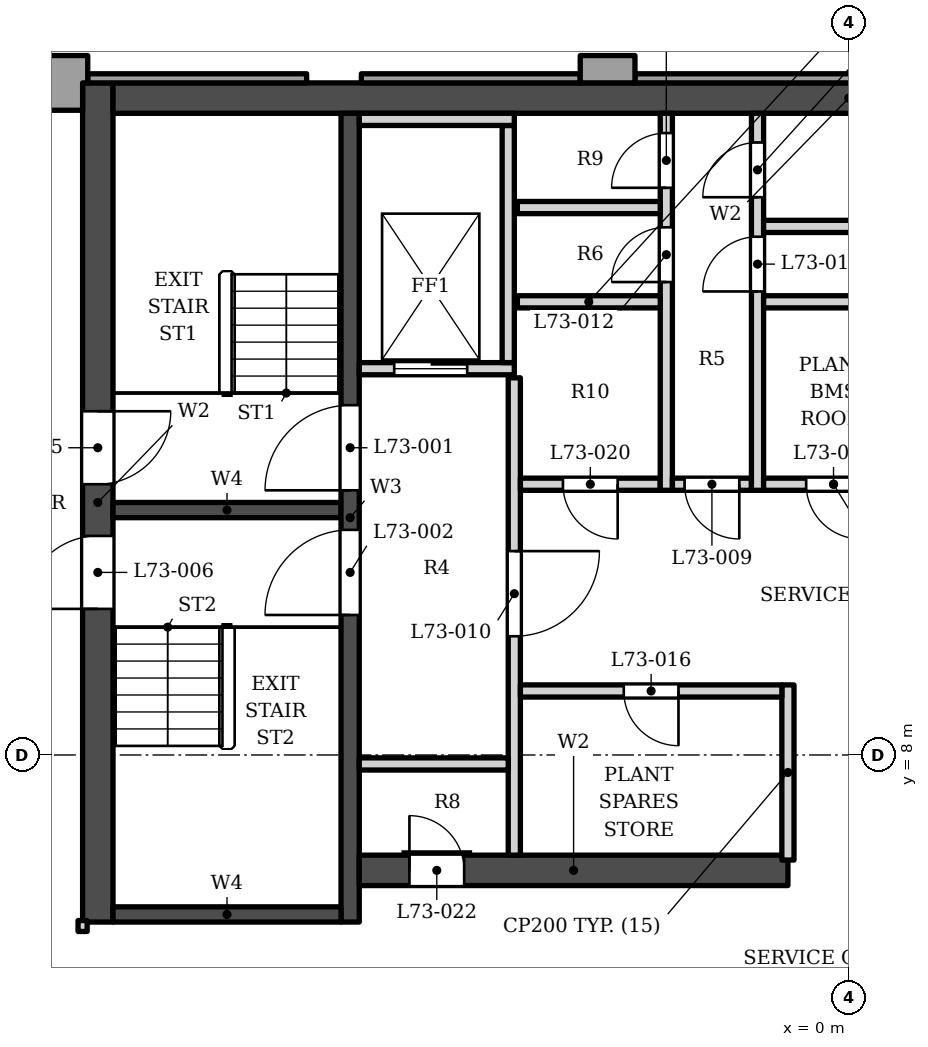
"""IFC4 building model, lengths in metres.
Left out: names, types, materials, properties, quantities, classifications, styles, units other than length and angle.
Written with IfcOpenShell. Run it as: python <this file> out.ifc"""

import sys

from ifc_helpers import new_model, si_unit, direction, frame, frame_2d, origin, place, context, subcontext, project, spatial, polyline, rectangle, outline, extrude, element, fill, save


model = new_model("IFC4")
c1 = context("Model", 3, precision=1e-05, world=origin(), true_north=direction((0.0, 1.0)))
c2 = subcontext(c1, "Body", "Model", "MODEL_VIEW")
j1 = project(units=[si_unit("LENGTHUNIT", "METRE"), si_unit("PLANEANGLEUNIT", "RADIAN")], contexts=[c1])
p1 = place(None, origin())
s1 = spatial("IfcSite", under=j1, at=p1, CompositionType="ELEMENT")
p2 = place(p1, origin())
s2 = spatial("IfcBuilding", under=s1, at=p2, CompositionType="ELEMENT")
p3 = place(p2, frame((0.0, 0.0, 310.5)))
s3 = spatial("IfcBuildingStorey", under=s2, at=p3, CompositionType="ELEMENT", Elevation=310.5)
p4 = place(p3, frame((-12.1, 18.802, 0.0), z_axis=(0.0, 0.0, 1.0), x_axis=(1.0, 0.0, 0.0)))
e1 = element("IfcWall", 1, at=p4, inside=s3, PredefinedType="SHEAR", context=c2, shape_type="SweptSolid", body=[
    extrude(rectangle(XDim=24.2, YDim=0.5, at=frame_2d((12.1, 0.0))), origin(), (0.0, 0.0, 1.0), 5.0),
])
p5 = place(p3, frame((-12.35, 5.253, 0.0), z_axis=(0.0, 0.0, 1.0), x_axis=(0.0, 1.0, 0.0)))
e2 = element("IfcWall", 2, at=p5, inside=s3, PredefinedType="SHEAR", context=c2, shape_type="SweptSolid", body=[
    extrude(rectangle(XDim=13.8, YDim=0.5, at=frame_2d((6.9, 0.0))), origin(), (0.0, 0.0, 1.0), 5.0),
])
p6 = place(p5, frame((7.2, 0.0, 0.0)))
e3 = element("IfcOpeningElement", 3, at=p6, cuts=e2, PredefinedType="OPENING", context=c2, shape_type="SweptSolid", body=[
    extrude(rectangle(XDim=1.2, YDim=2.1, at=frame_2d((0.6, 1.05))), frame((0.0, 0.26, 0.0), z_axis=(0.0, -1.0, 0.0), x_axis=(1.0, 0.0, 0.0)), (0.0, 0.0, 1.0), 0.52),
])
p7 = place(p5, frame((5.15, 0.0, 0.0)))
e4 = element("IfcOpeningElement", 4, at=p7, cuts=e2, PredefinedType="OPENING", context=c2, shape_type="SweptSolid", body=[
    extrude(rectangle(XDim=1.2, YDim=2.1, at=frame_2d((0.6, 1.05))), frame((0.0, 0.26, 0.0), z_axis=(0.0, -1.0, 0.0), x_axis=(1.0, 0.0, 0.0)), (0.0, 0.0, 1.0), 0.52),
])
p8 = place(p3, frame((-8.2, 5.253, 0.0), z_axis=(0.0, 0.0, 1.0), x_axis=(0.0, 1.0, 0.0)))
e5 = element("IfcWall", 5, at=p8, inside=s3, PredefinedType="SHEAR", context=c2, shape_type="SweptSolid", body=[
    extrude(rectangle(XDim=13.3, YDim=0.3, at=frame_2d((6.65, 0.0))), origin(), (0.0, 0.0, 1.0), 5.0),
])
p9 = place(p8, frame((7.1, 0.0, 0.0)))
e6 = element("IfcOpeningElement", 6, at=p9, cuts=e5, PredefinedType="OPENING", context=c2, shape_type="SweptSolid", body=[
    extrude(rectangle(XDim=1.4, YDim=2.1, at=frame_2d((0.7, 1.05))), frame((0.0, 0.16, 0.0), z_axis=(0.0, -1.0, 0.0), x_axis=(1.0, 0.0, 0.0)), (0.0, 0.0, 1.0), 0.32),
])
p10 = place(p8, frame((5.05, 0.0, 0.0)))
e7 = element("IfcOpeningElement", 7, at=p10, cuts=e5, PredefinedType="OPENING", context=c2, shape_type="SweptSolid", body=[
    extrude(rectangle(XDim=1.4, YDim=2.1, at=frame_2d((0.7, 1.05))), frame((0.0, 0.16, 0.0), z_axis=(0.0, -1.0, 0.0), x_axis=(1.0, 0.0, 0.0)), (0.0, 0.0, 1.0), 0.32),
])
for number, where, z_axis, x_axis in (
    (8, (-12.1, 12.028, 0.0), (0.0, 0.0, 1.0), (1.0, 0.0, 0.0)),
    (9, (-12.1, 5.378, 0.0), (0.0, 0.0, 1.0), (1.0, 0.0, 0.0)),
):
    element("IfcWall", number, at=place(p3, frame(where, z_axis=z_axis, x_axis=x_axis)), inside=s3, PredefinedType="SHEAR", context=c2, shape_type="SweptSolid", body=[
        extrude(rectangle(XDim=3.75, YDim=0.25, at=frame_2d((1.875, 0.0))), origin(), (0.0, 0.0, 1.0), 5.0),
    ])
p11 = place(p3, frame((-8.05, 6.103, 0.0), z_axis=(0.0, 0.0, 1.0), x_axis=(1.0, 0.0, 0.0)))
e10 = element("IfcWall", 10, at=p11, inside=s3, PredefinedType="SHEAR", context=c2, shape_type="SweptSolid", body=[
    extrude(rectangle(XDim=7.05, YDim=0.5, at=frame_2d((3.525, 0.0))), origin(), (0.0, 0.0, 1.0), 5.0),
])
p12 = place(p11, frame((0.825, 0.0, 0.0)))
e11 = element("IfcOpeningElement", 11, at=p12, cuts=e10, PredefinedType="OPENING", context=c2, shape_type="SweptSolid", body=[
    extrude(rectangle(XDim=0.9, YDim=2.1, at=frame_2d((0.45, 1.05))), frame((0.0, 0.26, 0.0), z_axis=(0.0, -1.0, 0.0), x_axis=(1.0, 0.0, 0.0)), (0.0, 0.0, 1.0), 0.52),
])
p13 = place(p3, origin())
e12 = element("IfcWall", 12, at=p13, inside=s3, PredefinedType="SOLIDWALL", context=c2, shape_type="SweptSolid", body=[
    extrude(outline(polyline([(-4.416, 19.502), (-4.416, 19.052), (-3.516, 19.052), (-3.516, 19.502), (-4.416, 19.502)])), origin(), (0.0, 0.0, 1.0), 3.8),
])
p14 = place(p3, origin())
e13 = element("IfcWall", 13, at=p14, inside=s3, PredefinedType="SOLIDWALL", context=c2, shape_type="SweptSolid", body=[
    extrude(outline(polyline([(-13.416, 19.502), (-13.416, 18.603), (-12.6, 18.603), (-12.6, 19.052), (-12.516, 19.052), (-12.516, 19.502), (-13.416, 19.502)])), origin(), (0.0, 0.0, 1.0), 3.8),
])
p15 = place(p3, origin())
e14 = element("IfcWall", 14, at=p15, inside=s3, PredefinedType="ELEMENTEDWALL", context=c2, shape_type="SweptSolid", body=[
    extrude(outline(polyline([(0.084, 19.203), (-3.516, 19.203), (-3.516, 19.052), (0.084, 19.052), (0.084, 19.203)])), origin(), (0.0, 0.0, 1.0), 3.8),
])
p16 = place(p3, origin())
e15 = element("IfcWall", 15, at=p16, inside=s3, PredefinedType="ELEMENTEDWALL", context=c2, shape_type="SweptSolid", body=[
    extrude(outline(polyline([(-4.416, 19.203), (-8.016, 19.203), (-8.016, 19.052), (-4.416, 19.052), (-4.416, 19.203)])), origin(), (0.0, 0.0, 1.0), 3.8),
])
p17 = place(p3, origin())
e16 = element("IfcWall", 16, at=p17, inside=s3, PredefinedType="ELEMENTEDWALL", context=c2, shape_type="SweptSolid", body=[
    extrude(outline(polyline([(-8.916, 19.203), (-12.516, 19.203), (-12.516, 19.052), (-8.916, 19.052), (-8.916, 19.203)])), origin(), (0.0, 0.0, 1.0), 3.8),
])
p18 = place(p3, frame((-1.0, 6.273, 0.0), z_axis=(0.0, 0.0, 1.0), x_axis=(0.0, 1.0, 0.0)))
e17 = element("IfcWall", 17, at=p18, inside=s3, PredefinedType="PARTITIONING", context=c2, shape_type="SweptSolid", body=[
    extrude(rectangle(XDim=2.88, YDim=0.2, at=frame_2d((1.44, 0.0))), origin(), (0.0, 0.0, 1.0), 4.8),
])
p19 = place(p3, frame((-5.5, 6.353, 0.0), z_axis=(0.0, 0.0, 1.0), x_axis=(0.0, 1.0, 0.0)))
e18 = element("IfcWall", 18, at=p19, inside=s3, PredefinedType="SOLIDWALL", context=c2, shape_type="SweptSolid", body=[
    extrude(rectangle(XDim=7.85, YDim=0.2, at=frame_2d((3.925, 0.0))), origin(), (0.0, 0.0, 1.0), 4.8),
])
p20 = place(p19, frame((3.6, 0.0, 0.0)))
e19 = element("IfcOpeningElement", 19, at=p20, cuts=e18, PredefinedType="OPENING", context=c2, shape_type="SweptSolid", body=[
    extrude(rectangle(XDim=1.4, YDim=2.1, at=frame_2d((0.7, 1.05))), frame((0.0, 0.11, 0.0), z_axis=(0.0, -1.0, 0.0), x_axis=(1.0, 0.0, 0.0)), (0.0, 0.0, 1.0), 0.22),
])
p21 = place(p3, frame((-8.05, 7.853, 0.0), z_axis=(0.0, 0.0, 1.0), x_axis=(1.0, 0.0, 0.0)))
e20 = element("IfcWall", 20, at=p21, inside=s3, PredefinedType="SOLIDWALL", context=c2, shape_type="SweptSolid", body=[
    extrude(rectangle(XDim=2.45, YDim=0.2, at=frame_2d((1.225, 0.0))), origin(), (0.0, 0.0, 1.0), 4.8),
])
p22 = place(p3, frame((-5.4, 9.052, 0.0), z_axis=(0.0, 0.0, 1.0), x_axis=(1.0, 0.0, 0.0)))
e21 = element("IfcWall", 21, at=p22, inside=s3, PredefinedType="PARTITIONING", context=c2, shape_type="SweptSolid", body=[
    extrude(rectangle(XDim=4.3, YDim=0.2, at=frame_2d((2.15, 0.0))), origin(), (0.0, 0.0, 1.0), 4.8),
])
p23 = place(p22, frame((1.7, 0.0, 0.0)))
e22 = element("IfcOpeningElement", 22, at=p23, cuts=e21, PredefinedType="OPENING", context=c2, shape_type="SweptSolid", body=[
    extrude(rectangle(XDim=0.9, YDim=2.1, at=frame_2d((0.45, 1.05))), frame((0.0, 0.11, 0.0), z_axis=(0.0, -1.0, 0.0), x_axis=(1.0, 0.0, 0.0)), (0.0, 0.0, 1.0), 0.22),
])
p24 = place(p3, frame((-5.4, 12.453, 0.0), z_axis=(0.0, 0.0, 1.0), x_axis=(1.0, 0.0, 0.0)))
e23 = element("IfcWall", 23, at=p24, inside=s3, PredefinedType="PARTITIONING", context=c2, shape_type="SweptSolid", body=[
    extrude(rectangle(XDim=2.3, YDim=0.2, at=frame_2d((1.15, 0.0))), origin(), (0.0, 0.0, 1.0), 4.8),
])
p25 = place(p24, frame((0.7, 0.0, 0.0)))
e24 = element("IfcOpeningElement", 24, at=p25, cuts=e23, PredefinedType="OPENING", context=c2, shape_type="SweptSolid", body=[
    extrude(rectangle(XDim=0.9, YDim=2.1, at=frame_2d((0.45, 1.05))), frame((0.0, 0.11, 0.0), z_axis=(0.0, -1.0, 0.0), x_axis=(1.0, 0.0, 0.0)), (0.0, 0.0, 1.0), 0.22),
])
p26 = place(p3, frame((-3.0, 12.353, 0.0), z_axis=(0.0, 0.0, 1.0), x_axis=(0.0, 1.0, 0.0)))
e25 = element("IfcWall", 25, at=p26, inside=s3, PredefinedType="PARTITIONING", context=c2, shape_type="SweptSolid", body=[
    extrude(rectangle(XDim=6.2, YDim=0.2, at=frame_2d((3.1, 0.0))), origin(), (0.0, 0.0, 1.0), 4.8),
])
p27 = place(p26, frame((3.425, 0.0, 0.0)))
e26 = element("IfcOpeningElement", 26, at=p27, cuts=e25, PredefinedType="OPENING", context=c2, shape_type="SweptSolid", body=[
    extrude(rectangle(XDim=0.9, YDim=2.1, at=frame_2d((0.45, 1.05))), frame((0.0, 0.11, 0.0), z_axis=(0.0, -1.0, 0.0), x_axis=(1.0, 0.0, 0.0)), (0.0, 0.0, 1.0), 0.22),
])
p28 = place(p26, frame((4.975, 0.0, 0.0)))
e27 = element("IfcOpeningElement", 27, at=p28, cuts=e25, PredefinedType="OPENING", context=c2, shape_type="SweptSolid", body=[
    extrude(rectangle(XDim=0.9, YDim=2.1, at=frame_2d((0.45, 1.05))), frame((0.0, 0.11, 0.0), z_axis=(0.0, -1.0, 0.0), x_axis=(1.0, 0.0, 0.0)), (0.0, 0.0, 1.0), 0.22),
])
p29 = place(p3, frame((-2.9, 12.453, 0.0), z_axis=(0.0, 0.0, 1.0), x_axis=(1.0, 0.0, 0.0)))
e28 = element("IfcWall", 28, at=p29, inside=s3, PredefinedType="PARTITIONING", context=c2, shape_type="SweptSolid", body=[
    extrude(rectangle(XDim=1.3, YDim=0.2, at=frame_2d((0.65, 0.0))), origin(), (0.0, 0.0, 1.0), 4.8),
])
p30 = place(p29, frame((0.2, 0.0, 0.0)))
e29 = element("IfcOpeningElement", 29, at=p30, cuts=e28, PredefinedType="OPENING", context=c2, shape_type="SweptSolid", body=[
    extrude(rectangle(XDim=0.9, YDim=2.1, at=frame_2d((0.45, 1.05))), frame((0.0, 0.11, 0.0), z_axis=(0.0, -1.0, 0.0), x_axis=(1.0, 0.0, 0.0)), (0.0, 0.0, 1.0), 0.22),
])
p31 = place(p3, frame((-1.5, 12.353, 0.0), z_axis=(0.0, 0.0, 1.0), x_axis=(0.0, 1.0, 0.0)))
e30 = element("IfcWall", 30, at=p31, inside=s3, PredefinedType="PARTITIONING", context=c2, shape_type="SweptSolid", body=[
    extrude(rectangle(XDim=6.2, YDim=0.2, at=frame_2d((3.1, 0.0))), origin(), (0.0, 0.0, 1.0), 4.8),
])
p32 = place(p31, frame((3.27, 0.0, 0.0)))
e31 = element("IfcOpeningElement", 31, at=p32, cuts=e30, PredefinedType="OPENING", context=c2, shape_type="SweptSolid", body=[
    extrude(rectangle(XDim=0.9, YDim=2.1, at=frame_2d((0.45, 1.05))), frame((0.0, 0.11, 0.0), z_axis=(0.0, -1.0, 0.0), x_axis=(1.0, 0.0, 0.0)), (0.0, 0.0, 1.0), 0.22),
])
p33 = place(p31, frame((4.82, 0.0, 0.0)))
e32 = element("IfcOpeningElement", 32, at=p33, cuts=e30, PredefinedType="OPENING", context=c2, shape_type="SweptSolid", body=[
    extrude(rectangle(XDim=0.9, YDim=2.1, at=frame_2d((0.45, 1.05))), frame((0.0, 0.11, 0.0), z_axis=(0.0, -1.0, 0.0), x_axis=(1.0, 0.0, 0.0)), (0.0, 0.0, 1.0), 0.22),
])
p34 = place(p3, frame((-1.4, 12.453, 0.0), z_axis=(0.0, 0.0, 1.0), x_axis=(1.0, 0.0, 0.0)))
e33 = element("IfcWall", 33, at=p34, inside=s3, PredefinedType="PARTITIONING", context=c2, shape_type="SweptSolid", body=[
    extrude(rectangle(XDim=2.3, YDim=0.2, at=frame_2d((1.15, 0.0))), origin(), (0.0, 0.0, 1.0), 4.8),
])
p35 = place(p34, frame((0.7, 0.0, 0.0)))
e34 = element("IfcOpeningElement", 34, at=p35, cuts=e33, PredefinedType="OPENING", context=c2, shape_type="SweptSolid", body=[
    extrude(rectangle(XDim=0.9, YDim=2.1, at=frame_2d((0.45, 1.05))), frame((0.0, 0.11, 0.0), z_axis=(0.0, -1.0, 0.0), x_axis=(1.0, 0.0, 0.0)), (0.0, 0.0, 1.0), 0.22),
])
p36 = place(p3, frame((-8.05, 14.353, 0.0), z_axis=(0.0, 0.0, 1.0), x_axis=(1.0, 0.0, 0.0)))
e35 = element("IfcWall", 35, at=p36, inside=s3, PredefinedType="SOLIDWALL", context=c2, shape_type="SweptSolid", body=[
    extrude(rectangle(XDim=2.55, YDim=0.2, at=frame_2d((1.275, 0.0))), origin(), (0.0, 0.0, 1.0), 4.8),
])
p37 = place(p36, frame((0.575, 0.0, 0.0)))
e36 = element("IfcOpeningElement", 36, at=p37, cuts=e35, PredefinedType="OPENING", context=c2, shape_type="SweptSolid", body=[
    extrude(rectangle(XDim=1.2, YDim=2.1, at=frame_2d((0.6, 1.05))), frame((0.0, 0.11, 0.0), z_axis=(0.0, -1.0, 0.0), x_axis=(1.0, 0.0, 0.0)), (0.0, 0.0, 1.0), 0.22),
])
p38 = place(p3, frame((-5.6, 14.453, 0.0), z_axis=(0.0, 0.0, 1.0), x_axis=(0.0, 1.0, 0.0)))
e37 = element("IfcWall", 37, at=p38, inside=s3, PredefinedType="SOLIDWALL", context=c2, shape_type="SweptSolid", body=[
    extrude(rectangle(XDim=3.9, YDim=0.2, at=frame_2d((1.95, 0.0))), origin(), (0.0, 0.0, 1.0), 4.8),
])
p39 = place(p3, frame((-5.45, 15.453, 0.0), z_axis=(0.0, 0.0, 1.0), x_axis=(1.0, 0.0, 0.0)))
e38 = element("IfcWall", 38, at=p39, inside=s3, PredefinedType="SOLIDWALL", context=c2, shape_type="SweptSolid", body=[
    extrude(rectangle(XDim=2.35, YDim=0.2, at=frame_2d((1.175, 0.0))), origin(), (0.0, 0.0, 1.0), 4.8),
])
p40 = place(p3, frame((-1.4, 15.453, 0.0), z_axis=(0.0, 0.0, 1.0), x_axis=(1.0, 0.0, 0.0)))
e39 = element("IfcWall", 39, at=p40, inside=s3, PredefinedType="PARTITIONING", context=c2, shape_type="SweptSolid", body=[
    extrude(rectangle(XDim=2.3, YDim=0.2, at=frame_2d((1.15, 0.0))), origin(), (0.0, 0.0, 1.0), 4.8),
])
p41 = place(p3, frame((-1.4, 16.693, 0.0), z_axis=(0.0, 0.0, 1.0), x_axis=(1.0, 0.0, 0.0)))
e40 = element("IfcWall", 40, at=p41, inside=s3, PredefinedType="SOLIDWALL", context=c2, shape_type="SweptSolid", body=[
    extrude(rectangle(XDim=6.85, YDim=0.2, at=frame_2d((3.425, 0.0))), origin(), (0.0, 0.0, 1.0), 4.8),
])
p42 = place(p3, frame((-5.45, 17.003, 0.0), z_axis=(0.0, 0.0, 1.0), x_axis=(1.0, 0.0, 0.0)))
e41 = element("IfcWall", 41, at=p42, inside=s3, PredefinedType="SOLIDWALL", context=c2, shape_type="SweptSolid", body=[
    extrude(rectangle(XDim=2.35, YDim=0.2, at=frame_2d((1.175, 0.0))), origin(), (0.0, 0.0, 1.0), 4.8),
])
p43 = place(p3, frame((-8.05, 18.453, 0.0), z_axis=(0.0, 0.0, 1.0), x_axis=(1.0, 0.0, 0.0)))
e42 = element("IfcWall", 42, at=p43, inside=s3, PredefinedType="SOLIDWALL", context=c2, shape_type="SweptSolid", body=[
    extrude(rectangle(XDim=2.55, YDim=0.2, at=frame_2d((1.275, 0.0))), origin(), (0.0, 0.0, 1.0), 4.8),
])
p44 = place(p3, frame((-12.6, 5.098, 0.0), z_axis=(0.0, 0.0, 1.0), x_axis=(0.0, 1.0, 0.0)))
e43 = element("IfcWall", 43, at=p44, inside=s3, PredefinedType="PARTITIONING", context=c2, shape_type="SweptSolid", body=[
    extrude(rectangle(XDim=0.18, YDim=0.15, at=frame_2d((0.09, 0.0))), origin(), (0.0, 0.0, 1.0), 4.8),
])
p45 = place(p37, origin())
e44 = element("IfcDoor", 44, at=p45, inside=s3, OperationType="DOUBLE_DOOR_SLIDING", PredefinedType="DOOR", context=c2, shape_type="SweptSolid", body=[
    extrude(rectangle(XDim=1.2, YDim=2.1, at=frame_2d((0.6, 1.05))), frame((0.0, 0.025, 0.0), z_axis=(0.0, -1.0, 0.0), x_axis=(1.0, 0.0, 0.0)), (0.0, 0.0, 1.0), 0.05),
])
fill(e36, e44)
p46 = place(p9, origin())
e45 = element("IfcDoor", 45, at=p46, inside=s3, OperationType="SINGLE_SWING_LEFT", PredefinedType="DOOR", context=c2, shape_type="SweptSolid", body=[
    extrude(rectangle(XDim=1.4, YDim=2.1, at=frame_2d((0.7, 1.05))), frame((0.0, 0.025, 0.0), z_axis=(0.0, -1.0, 0.0), x_axis=(1.0, 0.0, 0.0)), (0.0, 0.0, 1.0), 0.05),
])
fill(e6, e45)
p47 = place(p10, origin())
e46 = element("IfcDoor", 46, at=p47, inside=s3, OperationType="SINGLE_SWING_LEFT", PredefinedType="DOOR", context=c2, shape_type="SweptSolid", body=[
    extrude(rectangle(XDim=1.4, YDim=2.1, at=frame_2d((0.7, 1.05))), frame((0.0, 0.025, 0.0), z_axis=(0.0, -1.0, 0.0), x_axis=(1.0, 0.0, 0.0)), (0.0, 0.0, 1.0), 0.05),
])
fill(e7, e46)
p48 = place(p6, origin())
e47 = element("IfcDoor", 47, at=p48, inside=s3, OperationType="SINGLE_SWING_RIGHT", PredefinedType="DOOR", context=c2, shape_type="SweptSolid", body=[
    extrude(rectangle(XDim=1.2, YDim=2.1, at=frame_2d((0.6, 1.05))), frame((0.0, 0.025, 0.0), z_axis=(0.0, -1.0, 0.0), x_axis=(1.0, 0.0, 0.0)), (0.0, 0.0, 1.0), 0.05),
])
fill(e3, e47)
p49 = place(p7, origin())
e48 = element("IfcDoor", 48, at=p49, inside=s3, OperationType="SINGLE_SWING_LEFT", PredefinedType="DOOR", context=c2, shape_type="SweptSolid", body=[
    extrude(rectangle(XDim=1.2, YDim=2.1, at=frame_2d((0.6, 1.05))), frame((0.0, 0.025, 0.0), z_axis=(0.0, -1.0, 0.0), x_axis=(1.0, 0.0, 0.0)), (0.0, 0.0, 1.0), 0.05),
])
fill(e4, e48)
p50 = place(p30, origin())
e49 = element("IfcDoor", 49, at=p50, inside=s3, OperationType="SINGLE_SWING_RIGHT", PredefinedType="DOOR", context=c2, shape_type="SweptSolid", body=[
    extrude(rectangle(XDim=0.9, YDim=2.1, at=frame_2d((0.45, 1.05))), frame((0.0, 0.025, 0.0), z_axis=(0.0, -1.0, 0.0), x_axis=(1.0, 0.0, 0.0)), (0.0, 0.0, 1.0), 0.05),
])
fill(e29, e49)
p51 = place(p20, origin())
e50 = element("IfcDoor", 50, at=p51, inside=s3, OperationType="SINGLE_SWING_RIGHT", PredefinedType="DOOR", context=c2, shape_type="SweptSolid", body=[
    extrude(rectangle(XDim=1.4, YDim=2.1, at=frame_2d((0.7, 1.05))), frame((0.0, 0.025, 0.0), z_axis=(0.0, -1.0, 0.0), x_axis=(1.0, 0.0, 0.0)), (0.0, 0.0, 1.0), 0.05),
])
fill(e19, e50)
p52 = place(p27, origin())
e51 = element("IfcDoor", 51, at=p52, inside=s3, OperationType="SINGLE_SWING_LEFT", PredefinedType="DOOR", context=c2, shape_type="SweptSolid", body=[
    extrude(rectangle(XDim=0.9, YDim=2.1, at=frame_2d((0.45, 1.05))), frame((0.0, 0.025, 0.0), z_axis=(0.0, -1.0, 0.0), x_axis=(1.0, 0.0, 0.0)), (0.0, 0.0, 1.0), 0.05),
])
fill(e26, e51)
p53 = place(p28, origin())
e52 = element("IfcDoor", 52, at=p53, inside=s3, OperationType="SINGLE_SWING_LEFT", PredefinedType="DOOR", context=c2, shape_type="SweptSolid", body=[
    extrude(rectangle(XDim=0.9, YDim=2.1, at=frame_2d((0.45, 1.05))), frame((0.0, 0.025, 0.0), z_axis=(0.0, -1.0, 0.0), x_axis=(1.0, 0.0, 0.0)), (0.0, 0.0, 1.0), 0.05),
])
fill(e27, e52)
p54 = place(p32, origin())
e53 = element("IfcDoor", 53, at=p54, inside=s3, OperationType="SINGLE_SWING_LEFT", PredefinedType="DOOR", context=c2, shape_type="SweptSolid", body=[
    extrude(rectangle(XDim=0.9, YDim=2.1, at=frame_2d((0.45, 1.05))), frame((0.0, 0.025, 0.0), z_axis=(0.0, -1.0, 0.0), x_axis=(1.0, 0.0, 0.0)), (0.0, 0.0, 1.0), 0.05),
])
fill(e31, e53)
p55 = place(p33, origin())
e54 = element("IfcDoor", 54, at=p55, inside=s3, OperationType="SINGLE_SWING_LEFT", PredefinedType="DOOR", context=c2, shape_type="SweptSolid", body=[
    extrude(rectangle(XDim=0.9, YDim=2.1, at=frame_2d((0.45, 1.05))), frame((0.0, 0.025, 0.0), z_axis=(0.0, -1.0, 0.0), x_axis=(1.0, 0.0, 0.0)), (0.0, 0.0, 1.0), 0.05),
])
fill(e32, e54)
p56 = place(p23, origin())
e55 = element("IfcDoor", 55, at=p56, inside=s3, OperationType="SINGLE_SWING_RIGHT", PredefinedType="DOOR", context=c2, shape_type="SweptSolid", body=[
    extrude(rectangle(XDim=0.9, YDim=2.1, at=frame_2d((0.45, 1.05))), frame((0.0, 0.025, 0.0), z_axis=(0.0, -1.0, 0.0), x_axis=(1.0, 0.0, 0.0)), (0.0, 0.0, 1.0), 0.05),
])
fill(e22, e55)
p57 = place(p25, origin())
e56 = element("IfcDoor", 56, at=p57, inside=s3, OperationType="SINGLE_SWING_RIGHT", PredefinedType="DOOR", context=c2, shape_type="SweptSolid", body=[
    extrude(rectangle(XDim=0.9, YDim=2.1, at=frame_2d((0.45, 1.05))), frame((0.0, 0.025, 0.0), z_axis=(0.0, -1.0, 0.0), x_axis=(1.0, 0.0, 0.0)), (0.0, 0.0, 1.0), 0.05),
])
fill(e24, e56)
p58 = place(p35, origin())
e57 = element("IfcDoor", 57, at=p58, inside=s3, OperationType="SINGLE_SWING_RIGHT", PredefinedType="DOOR", context=c2, shape_type="SweptSolid", body=[
    extrude(rectangle(XDim=0.9, YDim=2.1, at=frame_2d((0.45, 1.05))), frame((0.0, 0.025, 0.0), z_axis=(0.0, -1.0, 0.0), x_axis=(1.0, 0.0, 0.0)), (0.0, 0.0, 1.0), 0.05),
])
fill(e34, e57)
p59 = place(p12, origin())
e58 = element("IfcDoor", 58, at=p59, inside=s3, OperationType="SINGLE_SWING_LEFT", PredefinedType="DOOR", context=c2, shape_type="SweptSolid", body=[
    extrude(rectangle(XDim=0.9, YDim=2.1, at=frame_2d((0.45, 1.05))), frame((0.0, 0.025, 0.0), z_axis=(0.0, -1.0, 0.0), x_axis=(1.0, 0.0, 0.0)), (0.0, 0.0, 1.0), 0.05),
])
fill(e11, e58)
save(model, sys.argv[1])
